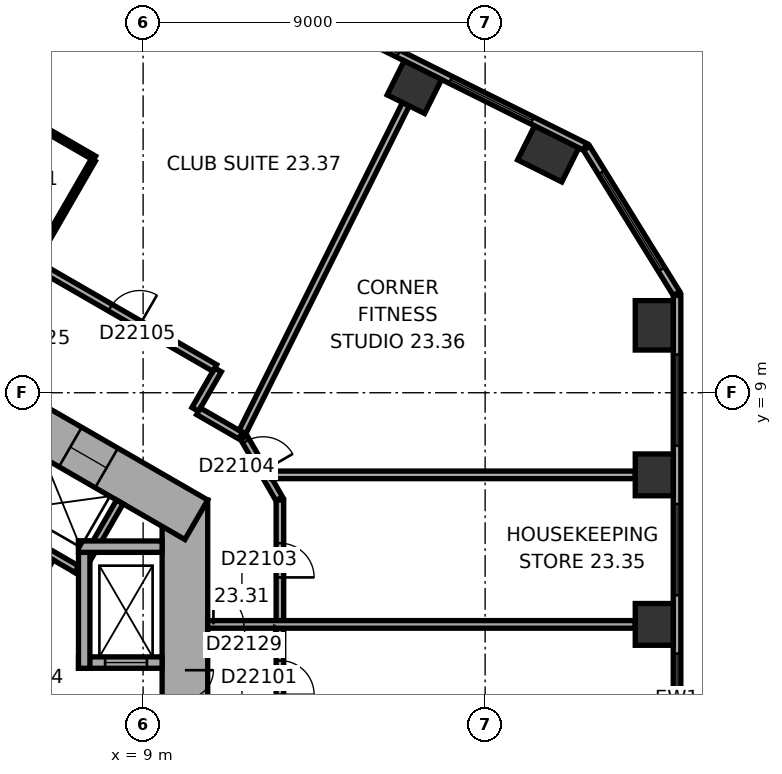
"""IFC4 building model, lengths in metres.
Left out: names, types, materials, properties, quantities, classifications, styles, units other than length and angle.
Written with IfcOpenShell. Run it as: python <this file> out.ifc"""

import sys

from ifc_helpers import new_model, si_unit, direction, frame, frame_2d, origin, origin_2d, place, context, subcontext, project, spatial, rectangle, extrude, element, fill, save


model = new_model("IFC4")
c1 = context("Model", 3, precision=1e-05, world=origin(), true_north=direction((0.0, 1.0)))
c2 = subcontext(c1, "Body", "Model", "MODEL_VIEW")
j1 = project(units=[si_unit("LENGTHUNIT", "METRE"), si_unit("PLANEANGLEUNIT", "RADIAN")], contexts=[c1])
p1 = place(None, origin())
s1 = spatial("IfcSite", under=j1, at=p1, CompositionType="ELEMENT")
p2 = place(p1, origin())
s2 = spatial("IfcBuilding", under=s1, at=p2, CompositionType="ELEMENT")
p3 = place(p2, frame((0.0, 0.0, 100.1)))
s3 = spatial("IfcBuildingStorey", under=s2, at=p3, CompositionType="ELEMENT", Elevation=100.1)
for number, where, z_axis, x_axis in (
    (1, (22.45, 2.905, 0.0), (0.0, 0.0, 1.0), (0.0, 1.0, 0.0)),
    (2, (22.45, 6.839, 0.0), (0.0, 0.0, 1.0), (0.0, 1.0, 0.0)),
):
    element("IfcColumn", number, at=place(p3, frame(where, z_axis=z_axis, x_axis=x_axis)), inside=s3, PredefinedType="COLUMN", context=c2, shape_type="SweptSolid", body=[
        extrude(rectangle(XDim=1.1, YDim=1.0, at=origin_2d()), origin(), (0.0, 0.0, 1.0), 3.3),
    ])
for number, where, z_axis, x_axis in (
    (3, (22.45, 10.774, 0.0), (0.0, 0.0, 1.0), (0.0, 1.0, 0.0)),
    (4, (19.659, 15.284, 0.0), (0.0, 0.0, 1.0), (-0.895, 0.446, 0.0)),
):
    element("IfcColumn", number, at=place(p3, frame(where, z_axis=z_axis, x_axis=x_axis)), inside=s3, PredefinedType="COLUMN", context=c2, shape_type="SweptSolid", body=[
        extrude(rectangle(XDim=1.3, YDim=1.0, at=origin_2d()), origin(), (0.0, 0.0, 1.0), 3.3),
    ])
p4 = place(p3, frame((16.138, 17.04, 0.0), z_axis=(0.0, 0.0, 1.0), x_axis=(-0.894934361602, 0.44619781311, 0.0)))
e5 = element("IfcColumn", 5, at=p4, inside=s3, PredefinedType="COLUMN", context=c2, shape_type="SweptSolid", body=[
    extrude(rectangle(XDim=1.1, YDim=1.0, at=origin_2d()), origin(), (0.0, 0.0, 1.0), 3.3),
])
p5 = place(p3, frame((10.1, -6.177, 0.0), z_axis=(0.0, 0.0, 1.0), x_axis=(0.0, 1.0, 0.0)))
e6 = element("IfcWall", 6, at=p5, inside=s3, PredefinedType="SHEAR", context=c2, shape_type="SweptSolid", body=[
    extrude(rectangle(XDim=12.355, YDim=1.2, at=frame_2d((6.177, 0.0))), origin(), (0.0, 0.0, 1.0), 3.3),
])
p6 = place(p5, frame((6.378, 0.0, 0.0)))
e7 = element("IfcOpeningElement", 7, at=p6, cuts=e6, PredefinedType="OPENING", context=c2, shape_type="SweptSolid", body=[
    extrude(rectangle(XDim=1.5, YDim=2.1, at=frame_2d((0.75, 1.05))), frame((0.0, 0.61, 0.0), z_axis=(0.0, -1.0, 0.0), x_axis=(1.0, 0.0, 0.0)), (0.0, 0.0, 1.0), 1.22),
])
p7 = place(p5, frame((1.828, 0.0, 0.0)))
e8 = element("IfcOpeningElement", 8, at=p7, cuts=e6, PredefinedType="OPENING", context=c2, shape_type="SweptSolid", body=[
    extrude(rectangle(XDim=1.1, YDim=2.1, at=frame_2d((0.55, 1.05))), frame((0.0, 0.61, 0.0), z_axis=(0.0, -1.0, 0.0), x_axis=(1.0, 0.0, 0.0)), (0.0, 0.0, 1.0), 1.22),
])
p8 = place(p5, frame((4.427, 0.0, 0.0)))
e9 = element("IfcOpeningElement", 9, at=p8, cuts=e6, PredefinedType="OPENING", context=c2, shape_type="SweptSolid", body=[
    extrude(rectangle(XDim=1.1, YDim=2.1, at=frame_2d((0.55, 1.05))), frame((0.0, 0.61, 0.0), z_axis=(0.0, -1.0, 0.0), x_axis=(1.0, 0.0, 0.0)), (0.0, 0.0, 1.0), 1.22),
])
p9 = place(p3, frame((10.4, 5.658, 0.0), z_axis=(0.0, 0.0, 1.0), x_axis=(-0.866021384402, 0.500006961711, 0.0)))
e10 = element("IfcWall", 10, at=p9, inside=s3, PredefinedType="SHEAR", context=c2, shape_type="SweptSolid", body=[
    extrude(rectangle(XDim=12.355, YDim=1.2, at=frame_2d((6.178, 0.0))), origin(), (0.0, 0.0, 1.0), 3.3),
])
p10 = place(p9, frame((2.728, 0.0, 0.0)))
e11 = element("IfcOpeningElement", 11, at=p10, cuts=e10, PredefinedType="OPENING", context=c2, shape_type="SweptSolid", body=[
    extrude(rectangle(XDim=1.1, YDim=2.1, at=frame_2d((0.55, 1.05))), frame((0.0, 0.61, 0.0), z_axis=(0.0, -1.0, 0.0), x_axis=(1.0, 0.0, 0.0)), (0.0, 0.0, 1.0), 1.22),
])
p11 = place(p9, frame((5.328, 0.0, 0.0)))
e12 = element("IfcOpeningElement", 12, at=p11, cuts=e10, PredefinedType="OPENING", context=c2, shape_type="SweptSolid", body=[
    extrude(rectangle(XDim=1.1, YDim=2.1, at=frame_2d((0.55, 1.05))), frame((0.0, 0.61, 0.0), z_axis=(0.0, -1.0, 0.0), x_axis=(1.0, 0.0, 0.0)), (0.0, 0.0, 1.0), 1.22),
])
p12 = place(p9, frame((7.928, 0.0, 0.0)))
e13 = element("IfcOpeningElement", 13, at=p12, cuts=e10, PredefinedType="OPENING", context=c2, shape_type="SweptSolid", body=[
    extrude(rectangle(XDim=1.1, YDim=2.1, at=frame_2d((0.55, 1.05))), frame((0.0, 0.61, 0.0), z_axis=(0.0, -1.0, 0.0), x_axis=(1.0, 0.0, 0.0)), (0.0, 0.0, 1.0), 1.22),
])
p13 = place(p3, frame((23.05, -9.687, 0.0), z_axis=(0.0, 0.0, 1.0), x_axis=(0.0, 1.0, 0.0)))
e14 = element("IfcWall", 14, at=p13, inside=s3, PredefinedType="STANDARD", context=c2, shape_type="SweptSolid", body=[
    extrude(rectangle(XDim=21.246, YDim=0.2, at=frame_2d((10.623, 0.0))), origin(), (0.0, 0.0, 1.0), 3.3),
])
p14 = place(p13, frame((1.555, 0.0, 0.8)))
e15 = element("IfcOpeningElement", 15, at=p14, cuts=e14, PredefinedType="OPENING", context=c2, shape_type="SweptSolid", body=[
    extrude(rectangle(XDim=2.4, YDim=1.7, at=frame_2d((1.2, 0.85))), frame((0.0, 0.11, 0.0), z_axis=(0.0, -1.0, 0.0), x_axis=(1.0, 0.0, 0.0)), (0.0, 0.0, 1.0), 0.22),
])
p15 = place(p13, frame((5.489, 0.0, 0.8)))
e16 = element("IfcOpeningElement", 16, at=p15, cuts=e14, PredefinedType="OPENING", context=c2, shape_type="SweptSolid", body=[
    extrude(rectangle(XDim=2.4, YDim=1.7, at=frame_2d((1.2, 0.85))), frame((0.0, 0.11, 0.0), z_axis=(0.0, -1.0, 0.0), x_axis=(1.0, 0.0, 0.0)), (0.0, 0.0, 1.0), 0.22),
])
p16 = place(p13, frame((9.424, 0.0, 0.8)))
e17 = element("IfcOpeningElement", 17, at=p16, cuts=e14, PredefinedType="OPENING", context=c2, shape_type="SweptSolid", body=[
    extrude(rectangle(XDim=2.4, YDim=1.7, at=frame_2d((1.2, 0.85))), frame((0.0, 0.11, 0.0), z_axis=(0.0, -1.0, 0.0), x_axis=(1.0, 0.0, 0.0)), (0.0, 0.0, 1.0), 0.22),
])
p17 = place(p13, frame((13.358, 0.0, 0.8)))
e18 = element("IfcOpeningElement", 18, at=p17, cuts=e14, PredefinedType="OPENING", context=c2, shape_type="SweptSolid", body=[
    extrude(rectangle(XDim=2.4, YDim=1.7, at=frame_2d((1.2, 0.85))), frame((0.0, 0.11, 0.0), z_axis=(0.0, -1.0, 0.0), x_axis=(1.0, 0.0, 0.0)), (0.0, 0.0, 1.0), 0.22),
])
p18 = place(p13, frame((17.293, 0.0, 0.8)))
e19 = element("IfcOpeningElement", 19, at=p18, cuts=e14, PredefinedType="OPENING", context=c2, shape_type="SweptSolid", body=[
    extrude(rectangle(XDim=2.4, YDim=1.7, at=frame_2d((1.2, 0.85))), frame((0.0, 0.11, 0.0), z_axis=(0.0, -1.0, 0.0), x_axis=(1.0, 0.0, 0.0)), (0.0, 0.0, 1.0), 0.22),
])
p19 = place(p3, frame((23.035, 11.612, 0.0), z_axis=(0.0, 0.0, 1.0), x_axis=(-0.526160091227, 0.850385535155, 0.0)))
e20 = element("IfcWall", 20, at=p19, inside=s3, PredefinedType="STANDARD", context=c2, shape_type="SweptSolid", body=[
    extrude(rectangle(XDim=4.494, YDim=0.2, at=frame_2d((2.247, 0.0))), origin(), (0.0, 0.0, 1.0), 3.3),
])
p20 = place(p19, frame((0.747, 0.0, 0.8)))
e21 = element("IfcOpeningElement", 21, at=p20, cuts=e20, PredefinedType="OPENING", context=c2, shape_type="SweptSolid", body=[
    extrude(rectangle(XDim=3.0, YDim=1.7, at=frame_2d((1.5, 0.85))), frame((0.0, 0.11, 0.0), z_axis=(0.0, -1.0, 0.0), x_axis=(1.0, 0.0, 0.0)), (0.0, 0.0, 1.0), 0.22),
])
p21 = place(p3, frame((20.63, 15.47, 0.0), z_axis=(0.0, 0.0, 1.0), x_axis=(-0.894934518609, 0.446197498203, 0.0)))
e22 = element("IfcWall", 22, at=p21, inside=s3, PredefinedType="STANDARD", context=c2, shape_type="SweptSolid", body=[
    extrude(rectangle(XDim=21.246, YDim=0.2, at=frame_2d((10.623, 0.0))), origin(), (0.0, 0.0, 1.0), 3.3),
])
p22 = place(p21, frame((1.553, 0.0, 0.8)))
e23 = element("IfcOpeningElement", 23, at=p22, cuts=e22, PredefinedType="OPENING", context=c2, shape_type="SweptSolid", body=[
    extrude(rectangle(XDim=2.4, YDim=1.7, at=frame_2d((1.2, 0.85))), frame((0.0, 0.11, 0.0), z_axis=(0.0, -1.0, 0.0), x_axis=(1.0, 0.0, 0.0)), (0.0, 0.0, 1.0), 0.22),
])
p23 = place(p21, frame((5.488, 0.0, 0.8)))
e24 = element("IfcOpeningElement", 24, at=p23, cuts=e22, PredefinedType="OPENING", context=c2, shape_type="SweptSolid", body=[
    extrude(rectangle(XDim=2.4, YDim=1.7, at=frame_2d((1.2, 0.85))), frame((0.0, 0.11, 0.0), z_axis=(0.0, -1.0, 0.0), x_axis=(1.0, 0.0, 0.0)), (0.0, 0.0, 1.0), 0.22),
])
p24 = place(p21, frame((9.422, 0.0, 0.8)))
e25 = element("IfcOpeningElement", 25, at=p24, cuts=e22, PredefinedType="OPENING", context=c2, shape_type="SweptSolid", body=[
    extrude(rectangle(XDim=2.4, YDim=1.7, at=frame_2d((1.2, 0.85))), frame((0.0, 0.11, 0.0), z_axis=(0.0, -1.0, 0.0), x_axis=(1.0, 0.0, 0.0)), (0.0, 0.0, 1.0), 0.22),
])
p25 = place(p21, frame((13.357, 0.0, 0.8)))
e26 = element("IfcOpeningElement", 26, at=p25, cuts=e22, PredefinedType="OPENING", context=c2, shape_type="SweptSolid", body=[
    extrude(rectangle(XDim=2.4, YDim=1.7, at=frame_2d((1.2, 0.85))), frame((0.0, 0.11, 0.0), z_axis=(0.0, -1.0, 0.0), x_axis=(1.0, 0.0, 0.0)), (0.0, 0.0, 1.0), 0.22),
])
p26 = place(p21, frame((17.292, 0.0, 0.8)))
e27 = element("IfcOpeningElement", 27, at=p26, cuts=e22, PredefinedType="OPENING", context=c2, shape_type="SweptSolid", body=[
    extrude(rectangle(XDim=2.4, YDim=1.7, at=frame_2d((1.2, 0.85))), frame((0.0, 0.11, 0.0), z_axis=(0.0, -1.0, 0.0), x_axis=(1.0, 0.0, 0.0)), (0.0, 0.0, 1.0), 0.22),
])
p27 = place(p3, frame((7.424, 4.259, 0.0), z_axis=(0.0, 0.0, 1.0), x_axis=(-0.866026010844, 0.49999894854, 0.0)))
e28 = element("IfcWall", 28, at=p27, inside=s3, PredefinedType="PARTITIONING", context=c2, shape_type="SweptSolid", body=[
    extrude(rectangle(XDim=8.0, YDim=0.2, at=frame_2d((4.0, 0.0))), origin(), (0.0, 0.0, 1.0), 3.05),
])
p28 = place(p3, frame((7.287, 4.222, 0.0), z_axis=(0.0, 0.0, 1.0), x_axis=(0.499946605688, 0.86605622881, 0.0)))
e29 = element("IfcWall", 29, at=p28, inside=s3, PredefinedType="PARTITIONING", context=c2, shape_type="SweptSolid", body=[
    extrude(rectangle(XDim=2.2, YDim=0.2, at=frame_2d((1.1, 0.0))), origin(), (0.0, 0.0, 1.0), 3.05),
])
p29 = place(p3, frame((4.158, 0.602, 0.0), z_axis=(0.0, 0.0, 1.0), x_axis=(0.499977259774, 0.866038532462, 0.0)))
e30 = element("IfcWall", 30, at=p29, inside=s3, PredefinedType="SHEAR", context=c2, shape_type="SweptSolid", body=[
    extrude(rectangle(XDim=4.7, YDim=0.3, at=frame_2d((2.35, 0.0))), origin(), (0.0, 0.0, 1.0), 3.05),
])
p30 = place(p29, frame((0.8, 0.0, 0.0)))
e31 = element("IfcOpeningElement", 31, at=p30, cuts=e30, PredefinedType="OPENING", context=c2, shape_type="SweptSolid", body=[
    extrude(rectangle(XDim=1.2, YDim=2.1, at=frame_2d((0.6, 1.05))), frame((0.0, 0.16, 0.0), z_axis=(0.0, -1.0, 0.0), x_axis=(1.0, 0.0, 0.0)), (0.0, 0.0, 1.0), 0.32),
])
p31 = place(p3, frame((7.3, 1.9, 0.0), z_axis=(0.0, 0.0, 1.0), x_axis=(1.0, 0.0, 0.0)))
e32 = element("IfcWall", 32, at=p31, inside=s3, PredefinedType="SHEAR", context=c2, shape_type="SweptSolid", body=[
    extrude(rectangle(XDim=2.2, YDim=0.3, at=frame_2d((1.1, 0.0))), origin(), (0.0, 0.0, 1.0), 3.05),
])
p32 = place(p31, frame((0.7, 0.0, 0.0)))
e33 = element("IfcOpeningElement", 33, at=p32, cuts=e32, PredefinedType="OPENING", context=c2, shape_type="SweptSolid", body=[
    extrude(rectangle(XDim=1.1, YDim=2.1, at=frame_2d((0.55, 1.05))), frame((0.0, 0.16, 0.0), z_axis=(0.0, -1.0, 0.0), x_axis=(1.0, 0.0, 0.0)), (0.0, 0.0, 1.0), 0.32),
])
p33 = place(p3, frame((7.45, 1.75, 0.0), z_axis=(0.0, 0.0, 1.0), x_axis=(0.0, 1.0, 0.0)))
e34 = element("IfcWall", 34, at=p33, inside=s3, PredefinedType="SHEAR", context=c2, shape_type="SweptSolid", body=[
    extrude(rectangle(XDim=3.35, YDim=0.3, at=frame_2d((1.675, 0.0))), origin(), (0.0, 0.0, 1.0), 3.05),
])
p34 = place(p3, frame((7.3, 4.95, 0.0), z_axis=(0.0, 0.0, 1.0), x_axis=(1.0, 0.0, 0.0)))
e35 = element("IfcWall", 35, at=p34, inside=s3, PredefinedType="SHEAR", context=c2, shape_type="SweptSolid", body=[
    extrude(rectangle(XDim=2.2, YDim=0.3, at=frame_2d((1.1, 0.0))), origin(), (0.0, 0.0, 1.0), 3.05),
])
p35 = place(p3, frame((5.001, 16.744, 0.0), z_axis=(0.0, 0.0, 1.0), x_axis=(0.866009488468, -0.500027565123, 0.0)))
e36 = element("IfcWall", 36, at=p35, inside=s3, PredefinedType="PARTITIONING", context=c2, shape_type="SweptSolid", body=[
    extrude(rectangle(XDim=3.14, YDim=0.12, at=frame_2d((1.57, 0.0))), origin(), (0.0, 0.0, 1.0), 3.05),
])
p36 = place(p3, frame((7.69, 15.122, 0.0), z_axis=(0.0, 0.0, 1.0), x_axis=(-0.499991248344, -0.866030456496, 0.0)))
e37 = element("IfcWall", 37, at=p36, inside=s3, PredefinedType="PARTITIONING", context=c2, shape_type="SweptSolid", body=[
    extrude(rectangle(XDim=3.04, YDim=0.12, at=frame_2d((1.52, 0.0))), origin(), (0.0, 0.0, 1.0), 3.05),
])
p37 = place(p3, frame((10.371, 8.561, 0.0), z_axis=(0.0, 0.0, 1.0), x_axis=(0.499986357472, 0.866033280158, 0.0)))
e38 = element("IfcWall", 38, at=p37, inside=s3, PredefinedType="PARTITIONING", context=c2, shape_type="SweptSolid", body=[
    extrude(rectangle(XDim=1.201, YDim=0.2, at=frame_2d((0.601, 0.0))), origin(), (0.0, 0.0, 1.0), 3.05),
])
p38 = place(p3, frame((10.885, 9.652, 0.0), z_axis=(0.0, 0.0, 1.0), x_axis=(-0.866033630405, 0.499985750804, 0.0)))
e39 = element("IfcWall", 39, at=p38, inside=s3, PredefinedType="PARTITIONING", context=c2, shape_type="SweptSolid", body=[
    extrude(rectangle(XDim=8.642, YDim=0.2, at=frame_2d((4.321, 0.0))), origin(), (0.0, 0.0, 1.0), 3.05),
])
p39 = place(p38, frame((2.276, 0.0, 0.0)))
e40 = element("IfcOpeningElement", 40, at=p39, cuts=e39, PredefinedType="OPENING", context=c2, shape_type="SweptSolid", body=[
    extrude(rectangle(XDim=0.9, YDim=2.1, at=frame_2d((0.45, 1.05))), frame((0.0, 0.11, 0.0), z_axis=(0.0, -1.0, 0.0), x_axis=(1.0, 0.0, 0.0)), (0.0, 0.0, 1.0), 0.22),
])
p40 = place(p3, frame((11.566, 7.871, 0.0), z_axis=(0.0, 0.0, 1.0), x_axis=(-0.866004557827, 0.500036104519, 0.0)))
e41 = element("IfcWall", 41, at=p40, inside=s3, PredefinedType="PARTITIONING", context=c2, shape_type="SweptSolid", body=[
    extrude(rectangle(XDim=1.28, YDim=0.2, at=frame_2d((0.64, 0.0))), origin(), (0.0, 0.0, 1.0), 3.05),
])
p41 = place(p3, frame((12.58, 6.212, 0.0), z_axis=(0.0, 0.0, 1.0), x_axis=(-0.500063286585, 0.865988862174, 0.0)))
e42 = element("IfcWall", 42, at=p41, inside=s3, PredefinedType="PARTITIONING", context=c2, shape_type="SweptSolid", body=[
    extrude(rectangle(XDim=1.86, YDim=0.2, at=frame_2d((0.93, 0.0))), origin(), (0.0, 0.0, 1.0), 3.05),
])
p42 = place(p41, frame((0.842, 0.0, 0.0)))
e43 = element("IfcOpeningElement", 43, at=p42, cuts=e42, PredefinedType="OPENING", context=c2, shape_type="SweptSolid", body=[
    extrude(rectangle(XDim=0.9, YDim=2.1, at=frame_2d((0.45, 1.05))), frame((0.0, 0.11, 0.0), z_axis=(0.0, -1.0, 0.0), x_axis=(1.0, 0.0, 0.0)), (0.0, 0.0, 1.0), 0.22),
])
p43 = place(p3, frame((12.6, 0.201, 0.0), z_axis=(0.0, 0.0, 1.0), x_axis=(0.0, 1.0, 0.0)))
e44 = element("IfcWall", 44, at=p43, inside=s3, PredefinedType="PARTITIONING", context=c2, shape_type="SweptSolid", body=[
    extrude(rectangle(XDim=2.604, YDim=0.2, at=frame_2d((1.302, 0.0))), origin(), (0.0, 0.0, 1.0), 3.05),
])
p44 = place(p43, frame((0.852, 0.0, 0.0)))
e45 = element("IfcOpeningElement", 45, at=p44, cuts=e44, PredefinedType="OPENING", context=c2, shape_type="SweptSolid", body=[
    extrude(rectangle(XDim=0.9, YDim=2.1, at=frame_2d((0.45, 1.05))), frame((0.0, 0.11, 0.0), z_axis=(0.0, -1.0, 0.0), x_axis=(1.0, 0.0, 0.0)), (0.0, 0.0, 1.0), 0.22),
])
p45 = place(p3, frame((12.6, 3.004, 0.0), z_axis=(0.0, 0.0, 1.0), x_axis=(0.0, 1.0, 0.0)))
e46 = element("IfcWall", 46, at=p45, inside=s3, PredefinedType="PARTITIONING", context=c2, shape_type="SweptSolid", body=[
    extrude(rectangle(XDim=3.173, YDim=0.2, at=frame_2d((1.586, 0.0))), origin(), (0.0, 0.0, 1.0), 3.05),
])
p46 = place(p45, frame((1.136, 0.0, 0.0)))
e47 = element("IfcOpeningElement", 47, at=p46, cuts=e46, PredefinedType="OPENING", context=c2, shape_type="SweptSolid", body=[
    extrude(rectangle(XDim=0.9, YDim=2.1, at=frame_2d((0.45, 1.05))), frame((0.0, 0.11, 0.0), z_axis=(0.0, -1.0, 0.0), x_axis=(1.0, 0.0, 0.0)), (0.0, 0.0, 1.0), 0.22),
])
p47 = place(p3, frame((15.915, 16.592, 0.0), z_axis=(0.0, 0.0, 1.0), x_axis=(-0.446199736347, -0.894933402709, 0.0)))
e48 = element("IfcWall", 48, at=p47, inside=s3, PredefinedType="PARTITIONING", context=c2, shape_type="SweptSolid", body=[
    extrude(rectangle(XDim=9.635, YDim=0.2, at=frame_2d((4.817, 0.0))), origin(), (0.0, 0.0, 1.0), 3.05),
])
p48 = place(p3, frame((21.95, 2.905, 0.0), z_axis=(0.0, 0.0, 1.0), x_axis=(-1.0, 0.0, 0.0)))
e49 = element("IfcWall", 49, at=p48, inside=s3, PredefinedType="PARTITIONING", context=c2, shape_type="SweptSolid", body=[
    extrude(rectangle(XDim=11.25, YDim=0.2, at=frame_2d((5.625, 0.0))), origin(), (0.0, 0.0, 1.0), 3.05),
])
p49 = place(p48, frame((9.5, 0.0, 0.0)))
e50 = element("IfcOpeningElement", 50, at=p49, cuts=e49, PredefinedType="OPENING", context=c2, shape_type="SweptSolid", body=[
    extrude(rectangle(XDim=1.6, YDim=2.1, at=frame_2d((0.8, 1.05))), frame((0.0, 0.11, 0.0), z_axis=(0.0, -1.0, 0.0), x_axis=(1.0, 0.0, 0.0)), (0.0, 0.0, 1.0), 0.22),
])
p50 = place(p3, frame((21.95, 6.839, 0.0), z_axis=(0.0, 0.0, 1.0), x_axis=(-1.0, 0.0, 0.0)))
e51 = element("IfcWall", 51, at=p50, inside=s3, PredefinedType="PARTITIONING", context=c2, shape_type="SweptSolid", body=[
    extrude(rectangle(XDim=9.572, YDim=0.2, at=frame_2d((4.786, 0.0))), origin(), (0.0, 0.0, 1.0), 3.05),
])
p51 = place(p16, origin())
e52 = element("IfcWindow", 52, at=p51, inside=s3, PartitioningType="SINGLE_PANEL", PredefinedType="WINDOW", context=c2, shape_type="SweptSolid", body=[
    extrude(rectangle(XDim=2.4, YDim=1.7, at=frame_2d((1.2, 0.85))), frame((0.0, 0.03, 0.0), z_axis=(0.0, -1.0, 0.0), x_axis=(1.0, 0.0, 0.0)), (0.0, 0.0, 1.0), 0.06),
])
fill(e17, e52)
p52 = place(p17, origin())
e53 = element("IfcWindow", 53, at=p52, inside=s3, PartitioningType="SINGLE_PANEL", PredefinedType="WINDOW", context=c2, shape_type="SweptSolid", body=[
    extrude(rectangle(XDim=2.4, YDim=1.7, at=frame_2d((1.2, 0.85))), frame((0.0, 0.03, 0.0), z_axis=(0.0, -1.0, 0.0), x_axis=(1.0, 0.0, 0.0)), (0.0, 0.0, 1.0), 0.06),
])
fill(e18, e53)
p53 = place(p18, origin())
e54 = element("IfcWindow", 54, at=p53, inside=s3, PartitioningType="SINGLE_PANEL", PredefinedType="WINDOW", context=c2, shape_type="SweptSolid", body=[
    extrude(rectangle(XDim=2.4, YDim=1.7, at=frame_2d((1.2, 0.85))), frame((0.0, 0.03, 0.0), z_axis=(0.0, -1.0, 0.0), x_axis=(1.0, 0.0, 0.0)), (0.0, 0.0, 1.0), 0.06),
])
fill(e19, e54)
p54 = place(p20, origin())
e55 = element("IfcWindow", 55, at=p54, inside=s3, PartitioningType="SINGLE_PANEL", PredefinedType="WINDOW", context=c2, shape_type="SweptSolid", body=[
    extrude(rectangle(XDim=3.0, YDim=1.7, at=frame_2d((1.5, 0.85))), frame((0.0, 0.03, 0.0), z_axis=(0.0, -1.0, 0.0), x_axis=(1.0, 0.0, 0.0)), (0.0, 0.0, 1.0), 0.06),
])
fill(e21, e55)
p55 = place(p22, origin())
e56 = element("IfcWindow", 56, at=p55, inside=s3, PartitioningType="SINGLE_PANEL", PredefinedType="WINDOW", context=c2, shape_type="SweptSolid", body=[
    extrude(rectangle(XDim=2.4, YDim=1.7, at=frame_2d((1.2, 0.85))), frame((0.0, 0.03, 0.0), z_axis=(0.0, -1.0, 0.0), x_axis=(1.0, 0.0, 0.0)), (0.0, 0.0, 1.0), 0.06),
])
fill(e23, e56)
p56 = place(p23, origin())
e57 = element("IfcWindow", 57, at=p56, inside=s3, PartitioningType="SINGLE_PANEL", PredefinedType="WINDOW", context=c2, shape_type="SweptSolid", body=[
    extrude(rectangle(XDim=2.4, YDim=1.7, at=frame_2d((1.2, 0.85))), frame((0.0, 0.03, 0.0), z_axis=(0.0, -1.0, 0.0), x_axis=(1.0, 0.0, 0.0)), (0.0, 0.0, 1.0), 0.06),
])
fill(e24, e57)
p57 = place(p6, origin())
e58 = element("IfcDoor", 58, at=p57, inside=s3, OperationType="DOUBLE_DOOR_SINGLE_SWING", PredefinedType="DOOR", context=c2, shape_type="SweptSolid", body=[
    extrude(rectangle(XDim=1.5, YDim=2.1, at=frame_2d((0.75, 1.05))), frame((0.0, 0.025, 0.0), z_axis=(0.0, -1.0, 0.0), x_axis=(1.0, 0.0, 0.0)), (0.0, 0.0, 1.0), 0.05),
])
fill(e7, e58)
p58 = place(p32, origin())
e59 = element("IfcDoor", 59, at=p58, inside=s3, OperationType="DOUBLE_DOOR_SLIDING", PredefinedType="DOOR", context=c2, shape_type="SweptSolid", body=[
    extrude(rectangle(XDim=1.1, YDim=2.1, at=frame_2d((0.55, 1.05))), frame((0.0, 0.025, 0.0), z_axis=(0.0, -1.0, 0.0), x_axis=(1.0, 0.0, 0.0)), (0.0, 0.0, 1.0), 0.05),
])
fill(e33, e59)
p59 = place(p10, origin())
e60 = element("IfcDoor", 60, at=p59, inside=s3, OperationType="DOUBLE_DOOR_SLIDING", PredefinedType="DOOR", context=c2, shape_type="SweptSolid", body=[
    extrude(rectangle(XDim=1.1, YDim=2.1, at=frame_2d((0.55, 1.05))), frame((0.0, 0.025, 0.0), z_axis=(0.0, -1.0, 0.0), x_axis=(1.0, 0.0, 0.0)), (0.0, 0.0, 1.0), 0.05),
])
fill(e11, e60)
p60 = place(p44, origin())
e61 = element("IfcDoor", 61, at=p60, inside=s3, OperationType="SINGLE_SWING_LEFT", PredefinedType="DOOR", context=c2, shape_type="SweptSolid", body=[
    extrude(rectangle(XDim=0.9, YDim=2.1, at=frame_2d((0.45, 1.05))), frame((0.0, 0.025, 0.0), z_axis=(0.0, -1.0, 0.0), x_axis=(1.0, 0.0, 0.0)), (0.0, 0.0, 1.0), 0.05),
])
fill(e45, e61)
p61 = place(p46, origin())
e62 = element("IfcDoor", 62, at=p61, inside=s3, OperationType="SINGLE_SWING_LEFT", PredefinedType="DOOR", context=c2, shape_type="SweptSolid", body=[
    extrude(rectangle(XDim=0.9, YDim=2.1, at=frame_2d((0.45, 1.05))), frame((0.0, 0.025, 0.0), z_axis=(0.0, -1.0, 0.0), x_axis=(1.0, 0.0, 0.0)), (0.0, 0.0, 1.0), 0.05),
])
fill(e47, e62)
p62 = place(p42, origin())
e63 = element("IfcDoor", 63, at=p62, inside=s3, OperationType="SINGLE_SWING_LEFT", PredefinedType="DOOR", context=c2, shape_type="SweptSolid", body=[
    extrude(rectangle(XDim=0.9, YDim=2.1, at=frame_2d((0.45, 1.05))), frame((0.0, 0.025, 0.0), z_axis=(0.0, -1.0, 0.0), x_axis=(1.0, 0.0, 0.0)), (0.0, 0.0, 1.0), 0.05),
])
fill(e43, e63)
p63 = place(p39, origin())
e64 = element("IfcDoor", 64, at=p63, inside=s3, OperationType="SINGLE_SWING_LEFT", PredefinedType="DOOR", context=c2, shape_type="SweptSolid", body=[
    extrude(rectangle(XDim=0.9, YDim=2.1, at=frame_2d((0.45, 1.05))), frame((0.0, 0.025, 0.0), z_axis=(0.0, -1.0, 0.0), x_axis=(1.0, 0.0, 0.0)), (0.0, 0.0, 1.0), 0.05),
])
fill(e40, e64)
p64 = place(p49, origin())
e65 = element("IfcDoor", 65, at=p64, inside=s3, OperationType="DOUBLE_DOOR_SINGLE_SWING", PredefinedType="DOOR", context=c2, shape_type="SweptSolid", body=[
    extrude(rectangle(XDim=1.6, YDim=2.1, at=frame_2d((0.8, 1.05))), frame((0.0, 0.025, 0.0), z_axis=(0.0, -1.0, 0.0), x_axis=(1.0, 0.0, 0.0)), (0.0, 0.0, 1.0), 0.05),
])
fill(e50, e65)
save(model, sys.argv[1])
